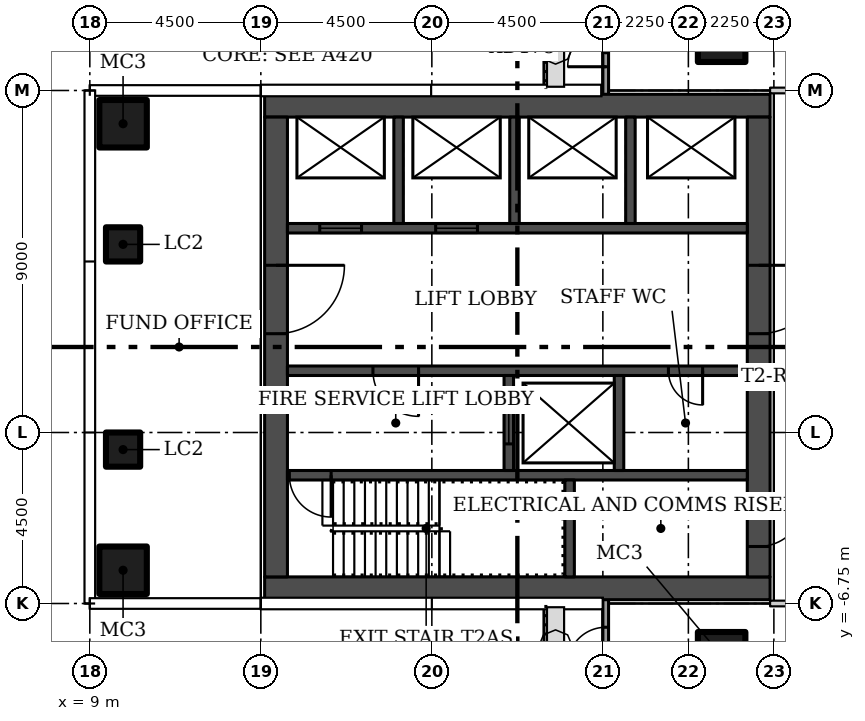
"""IFC4 building model, lengths in metres.
Left out: names, types, materials, properties, quantities, classifications, styles, units other than length and angle.
Written with IfcOpenShell. Run it as: python <this file> out.ifc"""

import sys

from ifc_helpers import new_model, si_unit, direction, frame, frame_2d, origin, origin_2d, place, context, subcontext, project, spatial, rectangle, hollow_rectangle, extrude, element, fill, save


model = new_model("IFC4")
c1 = context("Model", 3, precision=1e-05, world=origin(), true_north=direction((0.0, 1.0)))
c2 = subcontext(c1, "Body", "Model", "MODEL_VIEW")
j1 = project(units=[si_unit("LENGTHUNIT", "METRE"), si_unit("PLANEANGLEUNIT", "RADIAN")], contexts=[c1])
p1 = place(None, origin())
s1 = spatial("IfcSite", under=j1, at=p1, CompositionType="ELEMENT")
p2 = place(p1, origin())
s2 = spatial("IfcBuilding", under=s1, at=p2, CompositionType="ELEMENT")
p3 = place(p2, frame((0.0, 0.0, 120.9)))
s3 = spatial("IfcBuildingStorey", under=s2, at=p3, CompositionType="ELEMENT", Elevation=120.9)
for number, where in (
    (1, (25.625, 8.125, 0.0)),
    (2, (25.625, -8.125, 0.0)),
    (3, (9.875, -5.875, 0.0)),
    (4, (9.875, 5.875, 0.0)),
):
    element("IfcColumn", number, at=place(p3, frame(where)), inside=s3, PredefinedType="COLUMN", context=c2, shape_type="SweptSolid", body=[
        extrude(hollow_rectangle(XDim=1.25, YDim=1.25, WallThickness=0.05, at=origin_2d()), origin(), (0.0, 0.0, 1.0), 3.55),
    ])
for number, where in (
    (5, (9.875, -2.7, 0.0)),
    (6, (9.875, 2.7, 0.0)),
):
    element("IfcColumn", number, at=place(p3, frame(where)), inside=s3, PredefinedType="COLUMN", context=c2, shape_type="SweptSolid", body=[
        extrude(hollow_rectangle(XDim=0.9, YDim=0.9, WallThickness=0.036, at=origin_2d()), origin(), (0.0, 0.0, 1.0), 3.55),
    ])
p4 = place(p3, frame((26.9, 6.75, 0.0)))
e7 = element("IfcWall", 7, at=p4, inside=s3, PredefinedType="PARTITIONING", context=c2, shape_type="SweptSolid", body=[
    extrude(rectangle(XDim=13.7, YDim=0.15, at=frame_2d((6.85, 0.0))), origin(), (0.0, 0.0, 1.0), 3.55),
])
p5 = place(p4, frame((10.6, 0.0, 0.0)))
e8 = element("IfcOpeningElement", 8, at=p5, cuts=e7, PredefinedType="OPENING", context=c2, shape_type="SweptSolid", body=[
    extrude(rectangle(XDim=1.5, YDim=2.1, at=frame_2d((0.75, 1.05))), frame((0.0, 0.085, 0.0), z_axis=(0.0, -1.0, 0.0), x_axis=(1.0, 0.0, 0.0)), (0.0, 0.0, 1.0), 0.17),
])
p6 = place(p4, frame((6.1, 0.0, 0.0)))
e9 = element("IfcOpeningElement", 9, at=p6, cuts=e7, PredefinedType="OPENING", context=c2, shape_type="SweptSolid", body=[
    extrude(rectangle(XDim=1.5, YDim=2.1, at=frame_2d((0.75, 1.05))), frame((0.0, 0.085, 0.0), z_axis=(0.0, -1.0, 0.0), x_axis=(1.0, 0.0, 0.0)), (0.0, 0.0, 1.0), 0.17),
])
p7 = place(p4, frame((1.6, 0.0, 0.0)))
e10 = element("IfcOpeningElement", 10, at=p7, cuts=e7, PredefinedType="OPENING", context=c2, shape_type="SweptSolid", body=[
    extrude(rectangle(XDim=1.5, YDim=2.1, at=frame_2d((0.75, 1.05))), frame((0.0, 0.085, 0.0), z_axis=(0.0, -1.0, 0.0), x_axis=(1.0, 0.0, 0.0)), (0.0, 0.0, 1.0), 0.17),
])
p8 = place(p3, frame((40.6, -6.75, 0.0), z_axis=(0.0, 0.0, 1.0), x_axis=(-1.0, 0.0, 0.0)))
e11 = element("IfcWall", 11, at=p8, inside=s3, PredefinedType="PARTITIONING", context=c2, shape_type="SweptSolid", body=[
    extrude(rectangle(XDim=13.7, YDim=0.15, at=frame_2d((6.85, 0.0))), origin(), (0.0, 0.0, 1.0), 3.55),
])
p9 = place(p8, frame((10.6, 0.0, 0.0)))
e12 = element("IfcOpeningElement", 12, at=p9, cuts=e11, PredefinedType="OPENING", context=c2, shape_type="SweptSolid", body=[
    extrude(rectangle(XDim=1.5, YDim=2.1, at=frame_2d((0.75, 1.05))), frame((0.0, 0.085, 0.0), z_axis=(0.0, -1.0, 0.0), x_axis=(1.0, 0.0, 0.0)), (0.0, 0.0, 1.0), 0.17),
])
p10 = place(p8, frame((4.1, 0.0, 0.0)))
e13 = element("IfcOpeningElement", 13, at=p10, cuts=e11, PredefinedType="OPENING", context=c2, shape_type="SweptSolid", body=[
    extrude(rectangle(XDim=1.0, YDim=2.4, at=frame_2d((0.5, 1.2))), frame((0.0, 0.085, 0.0), z_axis=(0.0, -1.0, 0.0), x_axis=(1.0, 0.0, 0.0)), (0.0, 0.0, 1.0), 0.17),
])
p11 = place(p3, frame((22.575, 6.643, 0.0), z_axis=(0.0, 0.0, 1.0), x_axis=(0.0, 1.0, 0.0)))
e14 = element("IfcWall", 14, at=p11, inside=s3, PredefinedType="SOLIDWALL", context=c2, shape_type="SweptSolid", body=[
    extrude(rectangle(XDim=2.357, YDim=0.15, at=frame_2d((1.178, 0.0))), origin(), (0.0, 0.0, 1.0), 3.45),
])
p12 = place(p11, frame((0.732, 0.0, 0.0)))
e15 = element("IfcOpeningElement", 15, at=p12, cuts=e14, PredefinedType="OPENING", context=c2, shape_type="SweptSolid", body=[
    extrude(rectangle(XDim=1.0, YDim=2.4, at=frame_2d((0.5, 1.2))), frame((0.0, 0.085, 0.0), z_axis=(0.0, -1.0, 0.0), x_axis=(1.0, 0.0, 0.0)), (0.0, 0.0, 1.0), 0.17),
])
p13 = place(p3, frame((22.575, -9.0, 0.0), z_axis=(0.0, 0.0, 1.0), x_axis=(0.0, 1.0, 0.0)))
e16 = element("IfcWall", 16, at=p13, inside=s3, PredefinedType="SOLIDWALL", context=c2, shape_type="SweptSolid", body=[
    extrude(rectangle(XDim=2.357, YDim=0.15, at=frame_2d((1.178, 0.0))), origin(), (0.0, 0.0, 1.0), 3.45),
])
p14 = place(p13, frame((0.625, 0.0, 0.0)))
e17 = element("IfcOpeningElement", 17, at=p14, cuts=e16, PredefinedType="OPENING", context=c2, shape_type="SweptSolid", body=[
    extrude(rectangle(XDim=1.0, YDim=2.4, at=frame_2d((0.5, 1.2))), frame((0.0, 0.085, 0.0), z_axis=(0.0, -1.0, 0.0), x_axis=(1.0, 0.0, 0.0)), (0.0, 0.0, 1.0), 0.17),
])
for number, where in (
    (18, (13.6, -6.35, 0.0)),
    (19, (13.6, 6.35, 0.0)),
):
    element("IfcWall", number, at=place(p3, frame(where)), inside=s3, PredefinedType="SHEAR", context=c2, shape_type="SweptSolid", body=[
        extrude(rectangle(XDim=13.3, YDim=0.6, at=frame_2d((6.65, 0.0))), origin(), (0.0, 0.0, 1.0), 3.55),
    ])
p15 = place(p3, frame((13.9, 6.05, 0.0), z_axis=(0.0, 0.0, 1.0), x_axis=(0.0, -1.0, 0.0)))
e20 = element("IfcWall", 20, at=p15, inside=s3, PredefinedType="SHEAR", context=c2, shape_type="SweptSolid", body=[
    extrude(rectangle(XDim=12.1, YDim=0.6, at=frame_2d((6.05, 0.0))), origin(), (0.0, 0.0, 1.0), 3.55),
])
p16 = place(p15, frame((3.9, 0.0, 0.0)))
e21 = element("IfcOpeningElement", 21, at=p16, cuts=e20, PredefinedType="OPENING", context=c2, shape_type="SweptSolid", body=[
    extrude(rectangle(XDim=1.8, YDim=2.4, at=frame_2d((0.9, 1.2))), frame((0.0, 0.31, 0.0), z_axis=(0.0, -1.0, 0.0), x_axis=(1.0, 0.0, 0.0)), (0.0, 0.0, 1.0), 0.62),
])
p17 = place(p3, frame((26.6, 6.05, 0.0), z_axis=(0.0, 0.0, 1.0), x_axis=(0.0, -1.0, 0.0)))
e22 = element("IfcWall", 22, at=p17, inside=s3, PredefinedType="SHEAR", context=c2, shape_type="SweptSolid", body=[
    extrude(rectangle(XDim=12.1, YDim=0.6, at=frame_2d((6.05, 0.0))), origin(), (0.0, 0.0, 1.0), 3.55),
])
p18 = place(p17, frame((10.1, 0.0, 0.0)))
e23 = element("IfcOpeningElement", 23, at=p18, cuts=e22, PredefinedType="OPENING", context=c2, shape_type="SweptSolid", body=[
    extrude(rectangle(XDim=1.2, YDim=2.1, at=frame_2d((0.6, 1.05))), frame((0.0, 0.31, 0.0), z_axis=(0.0, -1.0, 0.0), x_axis=(1.0, 0.0, 0.0)), (0.0, 0.0, 1.0), 0.62),
])
p19 = place(p17, frame((3.9, 0.0, 0.0)))
e24 = element("IfcOpeningElement", 24, at=p19, cuts=e22, PredefinedType="OPENING", context=c2, shape_type="SweptSolid", body=[
    extrude(rectangle(XDim=1.8, YDim=2.4, at=frame_2d((0.9, 1.2))), frame((0.0, 0.31, 0.0), z_axis=(0.0, -1.0, 0.0), x_axis=(1.0, 0.0, 0.0)), (0.0, 0.0, 1.0), 0.62),
])
p20 = place(p3, frame((26.3, -3.375, 0.0), z_axis=(0.0, 0.0, 1.0), x_axis=(-1.0, 0.0, 0.0)))
e25 = element("IfcWall", 25, at=p20, inside=s3, PredefinedType="SHEAR", context=c2, shape_type="SweptSolid", body=[
    extrude(rectangle(XDim=12.1, YDim=0.25, at=frame_2d((6.05, 0.0))), origin(), (0.0, 0.0, 1.0), 3.55),
])
p21 = place(p20, frame((10.95, 0.0, 0.0)))
e26 = element("IfcOpeningElement", 26, at=p21, cuts=e25, PredefinedType="OPENING", context=c2, shape_type="SweptSolid", body=[
    extrude(rectangle(XDim=1.1, YDim=2.1, at=frame_2d((0.55, 1.05))), frame((0.0, 0.135, 0.0), z_axis=(0.0, -1.0, 0.0), x_axis=(1.0, 0.0, 0.0)), (0.0, 0.0, 1.0), 0.27),
])
p22 = place(p3, frame((21.625, -6.05, 0.0), z_axis=(0.0, 0.0, 1.0), x_axis=(0.0, 1.0, 0.0)))
e27 = element("IfcWall", 27, at=p22, inside=s3, PredefinedType="SHEAR", context=c2, shape_type="SweptSolid", body=[
    extrude(rectangle(XDim=2.55, YDim=0.25, at=frame_2d((1.275, 0.0))), origin(), (0.0, 0.0, 1.0), 3.55),
])
p23 = place(p3, frame((26.3, -0.625, 0.0), z_axis=(0.0, 0.0, 1.0), x_axis=(-1.0, 0.0, 0.0)))
e28 = element("IfcWall", 28, at=p23, inside=s3, PredefinedType="SHEAR", context=c2, shape_type="SweptSolid", body=[
    extrude(rectangle(XDim=12.1, YDim=0.25, at=frame_2d((6.05, 0.0))), origin(), (0.0, 0.0, 1.0), 3.55),
])
p24 = place(p23, frame((8.65, 0.0, 0.0)))
e29 = element("IfcOpeningElement", 29, at=p24, cuts=e28, PredefinedType="OPENING", context=c2, shape_type="SweptSolid", body=[
    extrude(rectangle(XDim=1.2, YDim=2.1, at=frame_2d((0.6, 1.05))), frame((0.0, 0.135, 0.0), z_axis=(0.0, -1.0, 0.0), x_axis=(1.0, 0.0, 0.0)), (0.0, 0.0, 1.0), 0.27),
])
p25 = place(p23, frame((1.175, 0.0, 0.0)))
e30 = element("IfcOpeningElement", 30, at=p25, cuts=e28, PredefinedType="OPENING", context=c2, shape_type="SweptSolid", body=[
    extrude(rectangle(XDim=0.9, YDim=2.1, at=frame_2d((0.45, 1.05))), frame((0.0, 0.135, 0.0), z_axis=(0.0, -1.0, 0.0), x_axis=(1.0, 0.0, 0.0)), (0.0, 0.0, 1.0), 0.27),
])
p26 = place(p3, frame((20.025, -3.25, 0.0), z_axis=(0.0, 0.0, 1.0), x_axis=(0.0, 1.0, 0.0)))
e31 = element("IfcWall", 31, at=p26, inside=s3, PredefinedType="SHEAR", context=c2, shape_type="SweptSolid", body=[
    extrude(rectangle(XDim=2.5, YDim=0.25, at=frame_2d((1.25, 0.0))), origin(), (0.0, 0.0, 1.0), 3.55),
])
p27 = place(p26, frame((0.7, 0.0, 0.0)))
e32 = element("IfcOpeningElement", 32, at=p27, cuts=e31, PredefinedType="OPENING", context=c2, shape_type="SweptSolid", body=[
    extrude(rectangle(XDim=1.1, YDim=2.1, at=frame_2d((0.55, 1.05))), frame((0.0, 0.135, 0.0), z_axis=(0.0, -1.0, 0.0), x_axis=(1.0, 0.0, 0.0)), (0.0, 0.0, 1.0), 0.27),
])
p28 = place(p3, frame((22.925, -3.25, 0.0), z_axis=(0.0, 0.0, 1.0), x_axis=(0.0, 1.0, 0.0)))
e33 = element("IfcWall", 33, at=p28, inside=s3, PredefinedType="SHEAR", context=c2, shape_type="SweptSolid", body=[
    extrude(rectangle(XDim=2.5, YDim=0.25, at=frame_2d((1.25, 0.0))), origin(), (0.0, 0.0, 1.0), 3.55),
])
p29 = place(p3, frame((14.2, 3.125, 0.0)))
e34 = element("IfcWall", 34, at=p29, inside=s3, PredefinedType="SHEAR", context=c2, shape_type="SweptSolid", body=[
    extrude(rectangle(XDim=12.1, YDim=0.25, at=frame_2d((6.05, 0.0))), origin(), (0.0, 0.0, 1.0), 3.55),
])
p30 = place(p29, frame((0.85, 0.0, 0.0)))
e35 = element("IfcOpeningElement", 35, at=p30, cuts=e34, PredefinedType="OPENING", context=c2, shape_type="SweptSolid", body=[
    extrude(rectangle(XDim=1.1, YDim=2.1, at=frame_2d((0.55, 1.05))), frame((0.0, 0.135, 0.0), z_axis=(0.0, -1.0, 0.0), x_axis=(1.0, 0.0, 0.0)), (0.0, 0.0, 1.0), 0.27),
])
p31 = place(p29, frame((3.9, 0.0, 0.0)))
e36 = element("IfcOpeningElement", 36, at=p31, cuts=e34, PredefinedType="OPENING", context=c2, shape_type="SweptSolid", body=[
    extrude(rectangle(XDim=1.1, YDim=2.1, at=frame_2d((0.55, 1.05))), frame((0.0, 0.135, 0.0), z_axis=(0.0, -1.0, 0.0), x_axis=(1.0, 0.0, 0.0)), (0.0, 0.0, 1.0), 0.27),
])
for number, where, z_axis, x_axis in (
    (37, (17.125, 3.25, 0.0), (0.0, 0.0, 1.0), (0.0, 1.0, 0.0)),
    (38, (20.175, 3.25, 0.0), (0.0, 0.0, 1.0), (0.0, 1.0, 0.0)),
    (39, (23.225, 3.25, 0.0), (0.0, 0.0, 1.0), (0.0, 1.0, 0.0)),
):
    element("IfcWall", number, at=place(p3, frame(where, z_axis=z_axis, x_axis=x_axis)), inside=s3, PredefinedType="SHEAR", context=c2, shape_type="SweptSolid", body=[
        extrude(rectangle(XDim=2.8, YDim=0.25, at=frame_2d((1.4, 0.0))), origin(), (0.0, 0.0, 1.0), 3.55),
    ])
p32 = place(p12, origin())
e40 = element("IfcDoor", 40, at=p32, inside=s3, OperationType="SINGLE_SWING_LEFT", PredefinedType="DOOR", context=c2, shape_type="SweptSolid", body=[
    extrude(rectangle(XDim=1.0, YDim=2.4, at=frame_2d((0.5, 1.2))), frame((0.0, 0.025, 0.0), z_axis=(0.0, -1.0, 0.0), x_axis=(1.0, 0.0, 0.0)), (0.0, 0.0, 1.0), 0.05),
])
fill(e15, e40)
p33 = place(p14, origin())
e41 = element("IfcDoor", 41, at=p33, inside=s3, OperationType="SINGLE_SWING_LEFT", PredefinedType="DOOR", context=c2, shape_type="SweptSolid", body=[
    extrude(rectangle(XDim=1.0, YDim=2.4, at=frame_2d((0.5, 1.2))), frame((0.0, 0.025, 0.0), z_axis=(0.0, -1.0, 0.0), x_axis=(1.0, 0.0, 0.0)), (0.0, 0.0, 1.0), 0.05),
])
fill(e17, e41)
p34 = place(p16, origin())
e42 = element("IfcDoor", 42, at=p34, inside=s3, OperationType="DOUBLE_DOOR_SINGLE_SWING", PredefinedType="DOOR", context=c2, shape_type="SweptSolid", body=[
    extrude(rectangle(XDim=1.8, YDim=2.4, at=frame_2d((0.9, 1.2))), frame((0.0, 0.025, 0.0), z_axis=(0.0, -1.0, 0.0), x_axis=(1.0, 0.0, 0.0)), (0.0, 0.0, 1.0), 0.05),
])
fill(e21, e42)
p35 = place(p18, origin())
e43 = element("IfcDoor", 43, at=p35, inside=s3, OperationType="SINGLE_SWING_RIGHT", PredefinedType="DOOR", context=c2, shape_type="SweptSolid", body=[
    extrude(rectangle(XDim=1.2, YDim=2.1, at=frame_2d((0.6, 1.05))), frame((0.0, 0.025, 0.0), z_axis=(0.0, -1.0, 0.0), x_axis=(1.0, 0.0, 0.0)), (0.0, 0.0, 1.0), 0.05),
])
fill(e23, e43)
p36 = place(p19, origin())
e44 = element("IfcDoor", 44, at=p36, inside=s3, OperationType="DOUBLE_DOOR_SINGLE_SWING", PredefinedType="DOOR", context=c2, shape_type="SweptSolid", body=[
    extrude(rectangle(XDim=1.8, YDim=2.4, at=frame_2d((0.9, 1.2))), frame((0.0, 0.025, 0.0), z_axis=(0.0, -1.0, 0.0), x_axis=(1.0, 0.0, 0.0)), (0.0, 0.0, 1.0), 0.05),
])
fill(e24, e44)
p37 = place(p21, origin())
e45 = element("IfcDoor", 45, at=p37, inside=s3, OperationType="SINGLE_SWING_RIGHT", PredefinedType="DOOR", context=c2, shape_type="SweptSolid", body=[
    extrude(rectangle(XDim=1.1, YDim=2.1, at=frame_2d((0.55, 1.05))), frame((0.0, 0.025, 0.0), z_axis=(0.0, -1.0, 0.0), x_axis=(1.0, 0.0, 0.0)), (0.0, 0.0, 1.0), 0.05),
])
fill(e26, e45)
p38 = place(p24, origin())
e46 = element("IfcDoor", 46, at=p38, inside=s3, OperationType="SINGLE_SWING_RIGHT", PredefinedType="DOOR", context=c2, shape_type="SweptSolid", body=[
    extrude(rectangle(XDim=1.2, YDim=2.1, at=frame_2d((0.6, 1.05))), frame((0.0, 0.025, 0.0), z_axis=(0.0, -1.0, 0.0), x_axis=(1.0, 0.0, 0.0)), (0.0, 0.0, 1.0), 0.05),
])
fill(e29, e46)
p39 = place(p25, origin())
e47 = element("IfcDoor", 47, at=p39, inside=s3, OperationType="SINGLE_SWING_LEFT", PredefinedType="DOOR", context=c2, shape_type="SweptSolid", body=[
    extrude(rectangle(XDim=0.9, YDim=2.1, at=frame_2d((0.45, 1.05))), frame((0.0, 0.025, 0.0), z_axis=(0.0, -1.0, 0.0), x_axis=(1.0, 0.0, 0.0)), (0.0, 0.0, 1.0), 0.05),
])
fill(e30, e47)
p40 = place(p27, origin())
e48 = element("IfcDoor", 48, at=p40, inside=s3, OperationType="SLIDING_TO_LEFT", PredefinedType="DOOR", context=c2, shape_type="SweptSolid", body=[
    extrude(rectangle(XDim=1.1, YDim=2.1, at=frame_2d((0.55, 1.05))), frame((0.0, 0.025, 0.0), z_axis=(0.0, -1.0, 0.0), x_axis=(1.0, 0.0, 0.0)), (0.0, 0.0, 1.0), 0.05),
])
fill(e32, e48)
p41 = place(p30, origin())
e49 = element("IfcDoor", 49, at=p41, inside=s3, OperationType="SLIDING_TO_LEFT", PredefinedType="DOOR", context=c2, shape_type="SweptSolid", body=[
    extrude(rectangle(XDim=1.1, YDim=2.1, at=frame_2d((0.55, 1.05))), frame((0.0, 0.025, 0.0), z_axis=(0.0, -1.0, 0.0), x_axis=(1.0, 0.0, 0.0)), (0.0, 0.0, 1.0), 0.05),
])
fill(e35, e49)
p42 = place(p31, origin())
e50 = element("IfcDoor", 50, at=p42, inside=s3, OperationType="SLIDING_TO_LEFT", PredefinedType="DOOR", context=c2, shape_type="SweptSolid", body=[
    extrude(rectangle(XDim=1.1, YDim=2.1, at=frame_2d((0.55, 1.05))), frame((0.0, 0.025, 0.0), z_axis=(0.0, -1.0, 0.0), x_axis=(1.0, 0.0, 0.0)), (0.0, 0.0, 1.0), 0.05),
])
fill(e36, e50)
save(model, sys.argv[1])
